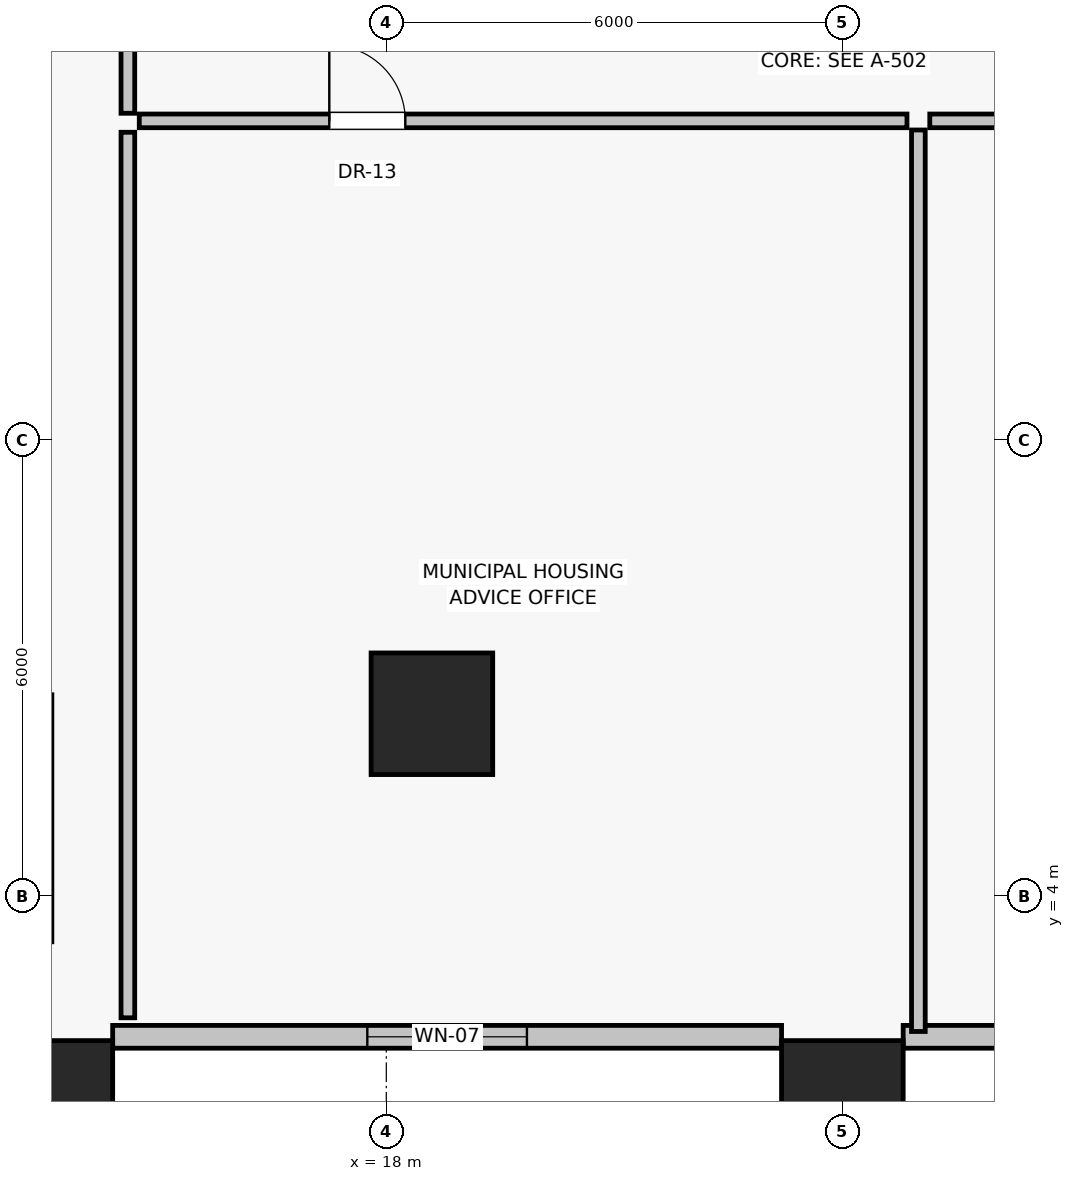
"""IFC4 building model, lengths in metres.
Left out: names, types, materials, properties, quantities, classifications, styles, units other than length and angle.
Written with IfcOpenShell. Run it as: python <this file> out.ifc"""

import sys

from ifc_helpers import new_model, si_unit, direction, frame, frame_2d, origin, origin_2d, place, context, subcontext, project, spatial, rectangle, extrude, source, transform, mapped, element, fill, save


model = new_model("IFC4")
c1 = context("Model", 3, precision=1e-05, world=origin(), true_north=direction((0.0, 1.0)))
c2 = subcontext(c1, "Body", "Model", "MODEL_VIEW")
j1 = project(units=[si_unit("LENGTHUNIT", "METRE"), si_unit("PLANEANGLEUNIT", "RADIAN")], contexts=[c1])
p1 = place(None, origin())
s1 = spatial("IfcSite", under=j1, at=p1, CompositionType="ELEMENT")
p2 = place(p1, origin())
s2 = spatial("IfcBuilding", under=s1, at=p2, CompositionType="ELEMENT")
p3 = place(p2, frame((0.0, 0.0, 5.2)))
s3 = spatial("IfcBuildingStorey", under=s2, at=p3, CompositionType="ELEMENT", Elevation=5.2)
for number, where, z_axis, x_axis in (
    (1, (13.6, 1.3, 0.0), (0.0, 0.0, 1.0), (1.0, 0.0, 0.0)),
    (2, (24.0, 1.3, 0.0), (0.0, 0.0, 1.0), (1.0, 0.0, 0.0)),
    (3, (18.6, 6.4, 0.0), (0.0, 0.0, 1.0), (1.0, 0.0, 0.0)),
):
    element("IfcColumn", number, at=place(p3, frame(where, z_axis=z_axis, x_axis=x_axis)), inside=s3, PredefinedType="COLUMN", context=c2, shape_type="SweptSolid", body=[
        extrude(rectangle(XDim=1.6, YDim=1.6, at=origin_2d()), origin(), (0.0, 0.0, 1.0), 4.4),
    ])
p4 = place(p3, frame((14.4, 2.15, 0.0), z_axis=(0.0, 0.0, 1.0), x_axis=(1.0, 0.0, 0.0)))
e4 = element("IfcWall", 4, at=p4, inside=s3, PredefinedType="SOLIDWALL", context=c2, shape_type="SweptSolid", body=[
    extrude(rectangle(XDim=8.8, YDim=0.3, at=frame_2d((4.4, 0.0))), origin(), (0.0, 0.0, 1.0), 3.0),
])
p5 = place(p4, frame((3.35, 0.0, 0.85)))
e5 = element("IfcOpeningElement", 5, at=p5, cuts=e4, PredefinedType="OPENING", context=c2, shape_type="SweptSolid", body=[
    extrude(rectangle(XDim=2.1, YDim=1.75, at=frame_2d((1.05, 0.875))), frame((0.0, 0.16, 0.0), z_axis=(0.0, -1.0, 0.0), x_axis=(1.0, 0.0, 0.0)), (0.0, 0.0, 1.0), 0.32),
])
p6 = place(p3, frame((24.8, 2.15, 0.0), z_axis=(0.0, 0.0, 1.0), x_axis=(1.0, 0.0, 0.0)))
e6 = element("IfcWall", 6, at=p6, inside=s3, PredefinedType="SOLIDWALL", context=c2, shape_type="SweptSolid", body=[
    extrude(rectangle(XDim=8.8, YDim=0.3, at=frame_2d((4.4, 0.0))), origin(), (0.0, 0.0, 1.0), 3.0),
])
p7 = place(p6, frame((3.35, 0.0, 0.85)))
e7 = element("IfcOpeningElement", 7, at=p7, cuts=e6, PredefinedType="OPENING", context=c2, shape_type="SweptSolid", body=[
    extrude(rectangle(XDim=2.1, YDim=1.75, at=frame_2d((1.05, 0.875))), frame((0.0, 0.16, 0.0), z_axis=(0.0, -1.0, 0.0), x_axis=(1.0, 0.0, 0.0)), (0.0, 0.0, 1.0), 0.32),
])
p8 = place(p3, frame((14.6, 14.3, 0.0), z_axis=(0.0, 0.0, 1.0), x_axis=(0.0, 1.0, 0.0)))
e8 = element("IfcWall", 8, at=p8, inside=s3, PredefinedType="PARTITIONING", context=c2, shape_type="SweptSolid", body=[
    extrude(rectangle(XDim=9.55, YDim=0.18, at=frame_2d((4.775, 0.0))), origin(), (0.0, 0.0, 1.0), 4.1),
])
p9 = place(p8, frame((2.5, 0.0, 0.0)))
e9 = element("IfcOpeningElement", 9, at=p9, cuts=e8, PredefinedType="OPENING", context=c2, shape_type="SweptSolid", body=[
    extrude(rectangle(XDim=1.0, YDim=2.01, at=frame_2d((0.5, 1.005))), frame((0.0, 0.1, 0.0), z_axis=(0.0, -1.0, 0.0), x_axis=(1.0, 0.0, 0.0)), (0.0, 0.0, 1.0), 0.2),
])
p10 = place(p3, frame((14.6, 2.4, 0.0), z_axis=(0.0, 0.0, 1.0), x_axis=(0.0, 1.0, 0.0)))
e10 = element("IfcWall", 10, at=p10, inside=s3, PredefinedType="PARTITIONING", context=c2, shape_type="SweptSolid", body=[
    extrude(rectangle(XDim=11.65, YDim=0.18, at=frame_2d((5.825, 0.0))), origin(), (0.0, 0.0, 1.0), 4.1),
])
p11 = place(p3, frame((14.75, 14.2, 0.0), z_axis=(0.0, 0.0, 1.0), x_axis=(1.0, 0.0, 0.0)))
e11 = element("IfcWall", 11, at=p11, inside=s3, PredefinedType="PARTITIONING", context=c2, shape_type="SweptSolid", body=[
    extrude(rectangle(XDim=10.1, YDim=0.18, at=frame_2d((5.05, 0.0))), origin(), (0.0, 0.0, 1.0), 4.1),
])
p12 = place(p11, frame((2.5, 0.0, 0.0)))
e12 = element("IfcOpeningElement", 12, at=p12, cuts=e11, PredefinedType="OPENING", context=c2, shape_type="SweptSolid", body=[
    extrude(rectangle(XDim=1.0, YDim=2.01, at=frame_2d((0.5, 1.005))), frame((0.0, 0.1, 0.0), z_axis=(0.0, -1.0, 0.0), x_axis=(1.0, 0.0, 0.0)), (0.0, 0.0, 1.0), 0.2),
])
p13 = place(p3, frame((25.15, 14.2, 0.0), z_axis=(0.0, 0.0, 1.0), x_axis=(1.0, 0.0, 0.0)))
e13 = element("IfcWall", 13, at=p13, inside=s3, PredefinedType="PARTITIONING", context=c2, shape_type="SweptSolid", body=[
    extrude(rectangle(XDim=8.1, YDim=0.18, at=frame_2d((4.05, 0.0))), origin(), (0.0, 0.0, 1.0), 4.1),
])
p14 = place(p13, frame((2.5, 0.0, 0.0)))
e14 = element("IfcOpeningElement", 14, at=p14, cuts=e13, PredefinedType="OPENING", context=c2, shape_type="SweptSolid", body=[
    extrude(rectangle(XDim=1.0, YDim=2.01, at=frame_2d((0.5, 1.005))), frame((0.0, 0.1, 0.0), z_axis=(0.0, -1.0, 0.0), x_axis=(1.0, 0.0, 0.0)), (0.0, 0.0, 1.0), 0.2),
])
p15 = place(p3, frame((25.0, 2.22, 0.0), z_axis=(0.0, 0.0, 1.0), x_axis=(0.0, 1.0, 0.0)))
e15 = element("IfcWall", 15, at=p15, inside=s3, PredefinedType="PARTITIONING", context=c2, shape_type="SweptSolid", body=[
    extrude(rectangle(XDim=11.86, YDim=0.18, at=frame_2d((5.93, 0.0))), origin(), (0.0, 0.0, 1.0), 4.1),
])
m1 = source(origin(), c2, "Body", "SweptSolid", [
    extrude(rectangle(XDim=2.1, YDim=1.75, at=frame_2d((1.05, 0.875))), frame((0.0, 0.03, 0.0), z_axis=(0.0, -1.0, 0.0), x_axis=(1.0, 0.0, 0.0)), (0.0, 0.0, 1.0), 0.06),
])
p16 = place(p5, origin())
e16 = element("IfcWindow", 16, at=p16, inside=s3, PartitioningType="DOUBLE_PANEL_VERTICAL", PredefinedType="WINDOW", context=c2, shape_type="MappedRepresentation", body=[
    mapped(m1, transform((0.0, 0.0, 0.0), scale=1.0)),
])
fill(e5, e16)
m2 = source(origin(), c2, "Body", "SweptSolid", [
    extrude(rectangle(XDim=1.0, YDim=2.01, at=frame_2d((0.5, 1.005))), frame((0.0, 0.025, 0.0), z_axis=(0.0, -1.0, 0.0), x_axis=(1.0, 0.0, 0.0)), (0.0, 0.0, 1.0), 0.05),
])
p17 = place(p12, origin())
e17 = element("IfcDoor", 17, at=p17, inside=s3, OperationType="SINGLE_SWING_LEFT", PredefinedType="DOOR", context=c2, shape_type="MappedRepresentation", body=[
    mapped(m2, transform((0.0, 0.0, 0.0), scale=1.0)),
])
fill(e12, e17)
save(model, sys.argv[1])
